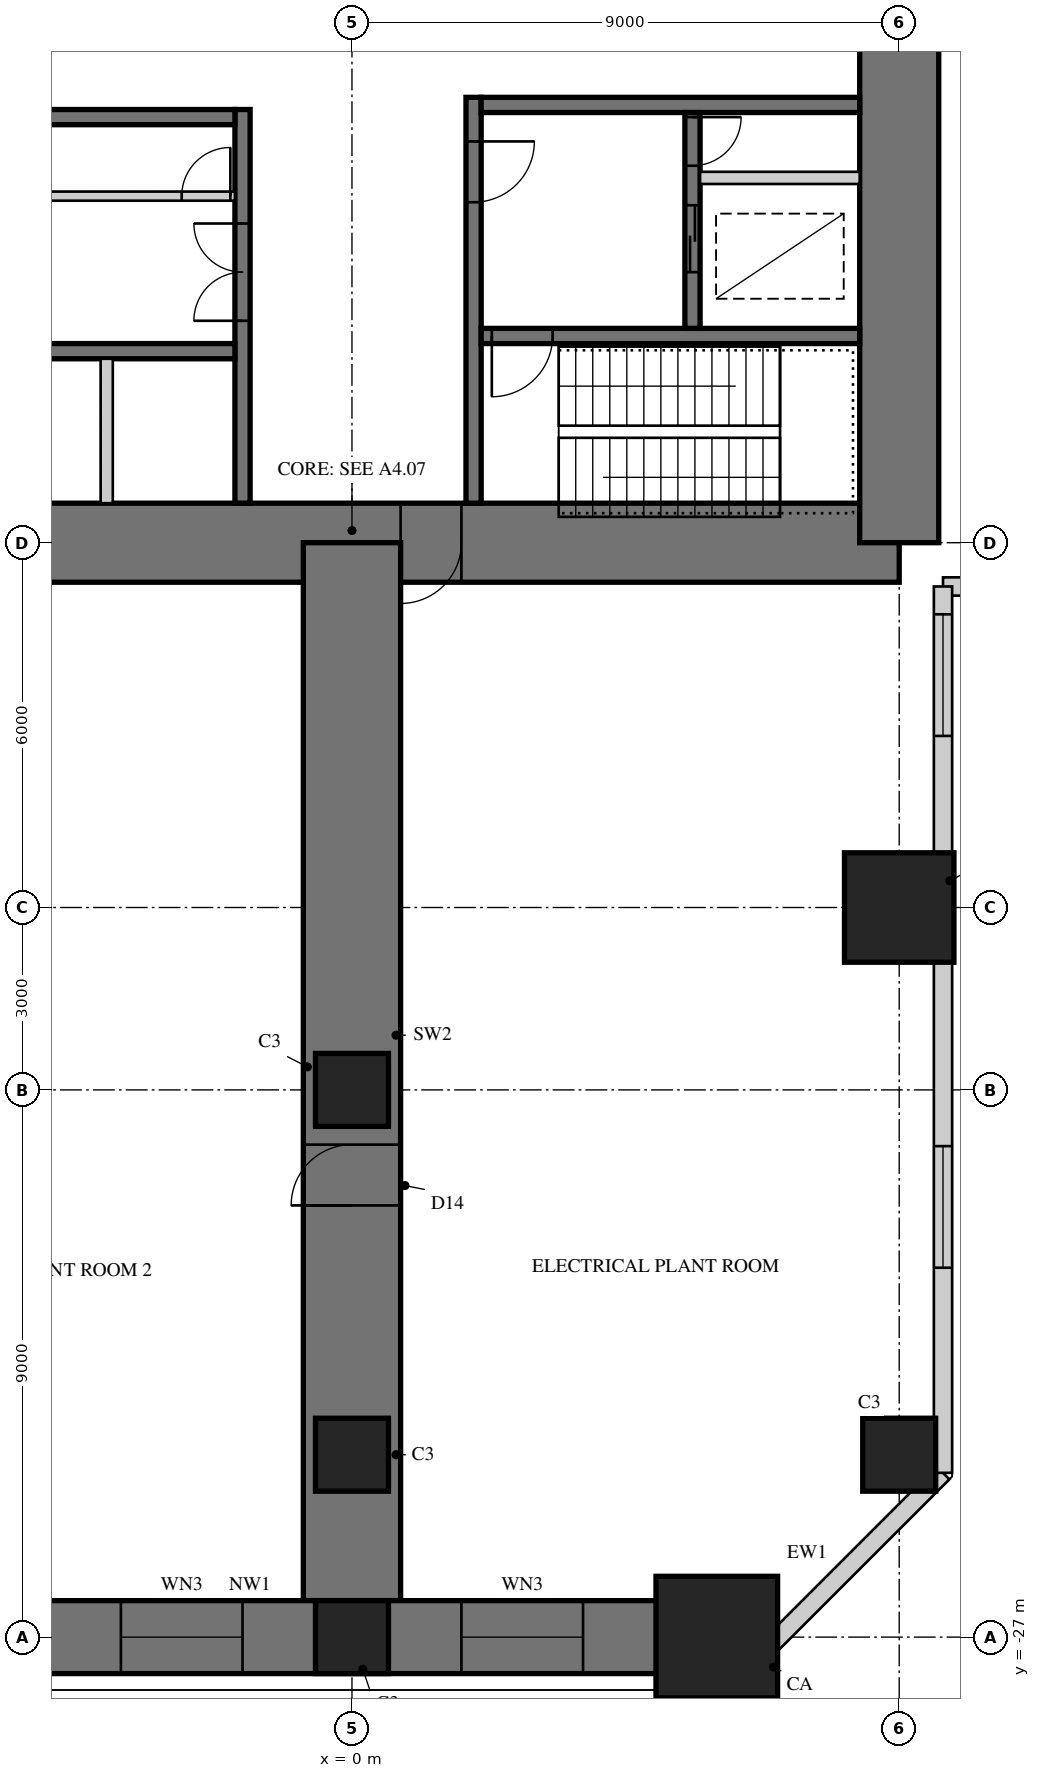
"""IFC4 building model, lengths in metres.
Left out: names, types, materials, properties, quantities, classifications, styles, units other than length and angle.
Written with IfcOpenShell. Run it as: python <this file> out.ifc"""

import sys

from ifc_helpers import new_model, si_unit, direction, frame, frame_2d, origin, origin_2d, place, context, subcontext, project, spatial, rectangle, hollow_rectangle, extrude, element, fill, save


model = new_model("IFC4")
c1 = context("Model", 3, precision=1e-05, world=origin(), true_north=direction((0.0, 1.0)))
c2 = subcontext(c1, "Body", "Model", "MODEL_VIEW")
j1 = project(units=[si_unit("LENGTHUNIT", "METRE"), si_unit("PLANEANGLEUNIT", "RADIAN")], contexts=[c1])
p1 = place(None, origin())
s1 = spatial("IfcSite", under=j1, at=p1, CompositionType="ELEMENT")
p2 = place(p1, origin())
s2 = spatial("IfcBuilding", under=s1, at=p2, CompositionType="ELEMENT")
p3 = place(p2, frame((0.0, 0.0, 18.5)))
s3 = spatial("IfcBuildingStorey", under=s2, at=p3, CompositionType="ELEMENT", Elevation=18.5)
p4 = place(p3, frame((-9.0, -9.0, 0.0), z_axis=(0.0, 0.0, 1.0), x_axis=(1.0, 0.0, 0.0)))
e1 = element("IfcWall", 1, at=p4, inside=s3, PredefinedType="SHEAR", context=c2, shape_type="SweptSolid", body=[
    extrude(rectangle(XDim=18.0, YDim=1.3, at=frame_2d((9.0, 0.0))), origin(), (0.0, 0.0, 1.0), 5.0),
])
p5 = place(p4, frame((9.8, 0.0, 0.0)))
e2 = element("IfcOpeningElement", 2, at=p5, cuts=e1, PredefinedType="OPENING", context=c2, shape_type="SweptSolid", body=[
    extrude(rectangle(XDim=1.0, YDim=2.4, at=frame_2d((0.5, 1.2))), frame((0.0, 0.66, 0.0), z_axis=(0.0, -1.0, 0.0), x_axis=(1.0, 0.0, 0.0)), (0.0, 0.0, 1.0), 1.32),
])
p6 = place(p3, frame((9.0, -9.0, 0.0), z_axis=(0.0, 0.0, 1.0), x_axis=(0.0, 1.0, 0.0)))
e3 = element("IfcWall", 3, at=p6, inside=s3, PredefinedType="SHEAR", context=c2, shape_type="SweptSolid", body=[
    extrude(rectangle(XDim=18.0, YDim=1.3, at=frame_2d((9.0, 0.0))), origin(), (0.0, 0.0, 1.0), 5.0),
])
p7 = place(p6, frame((9.8, 0.0, 0.0)))
e4 = element("IfcOpeningElement", 4, at=p7, cuts=e3, PredefinedType="OPENING", context=c2, shape_type="SweptSolid", body=[
    extrude(rectangle(XDim=1.0, YDim=2.4, at=frame_2d((0.5, 1.2))), frame((0.0, 0.66, 0.0), z_axis=(0.0, -1.0, 0.0), x_axis=(1.0, 0.0, 0.0)), (0.0, 0.0, 1.0), 1.32),
])
p8 = place(p3, frame((-1.8, -1.875, 0.0), z_axis=(0.0, 0.0, 1.0), x_axis=(0.0, -1.0, 0.0)))
e5 = element("IfcWall", 5, at=p8, inside=s3, PredefinedType="SHEAR", context=c2, shape_type="SweptSolid", body=[
    extrude(rectangle(XDim=6.475, YDim=0.25, at=frame_2d((3.238, 0.0))), origin(), (0.0, 0.0, 1.0), 5.0),
])
p9 = place(p8, frame((1.875, 0.0, 0.0)))
e6 = element("IfcOpeningElement", 6, at=p9, cuts=e5, PredefinedType="OPENING", context=c2, shape_type="SweptSolid", body=[
    extrude(rectangle(XDim=1.6, YDim=2.4, at=frame_2d((0.8, 1.2))), frame((0.0, 0.135, 0.0), z_axis=(0.0, -1.0, 0.0), x_axis=(1.0, 0.0, 0.0)), (0.0, 0.0, 1.0), 0.27),
])
for number, where, z_axis, x_axis in (
    (7, (-1.925, -2.0, 0.0), (0.0, 0.0, 1.0), (-1.0, 0.0, 0.0)),
    (8, (-1.925, -5.85, 0.0), (0.0, 0.0, 1.0), (-1.0, 0.0, 0.0)),
):
    element("IfcWall", number, at=place(p3, frame(where, z_axis=z_axis, x_axis=x_axis)), inside=s3, PredefinedType="SHEAR", context=c2, shape_type="SweptSolid", body=[
        extrude(rectangle(XDim=6.425, YDim=0.25, at=frame_2d((3.212, 0.0))), origin(), (0.0, 0.0, 1.0), 5.0),
    ])
p10 = place(p3, frame((-1.925, -3.3, 0.0), z_axis=(0.0, 0.0, 1.0), x_axis=(-1.0, 0.0, 0.0)))
e9 = element("IfcWall", 9, at=p10, inside=s3, PredefinedType="PARTITIONING", context=c2, shape_type="SweptSolid", body=[
    extrude(rectangle(XDim=6.425, YDim=0.15, at=frame_2d((3.212, 0.0))), origin(), (0.0, 0.0, 1.0), 5.0),
])
p11 = place(p10, frame((0.075, 0.0, 0.0)))
e10 = element("IfcOpeningElement", 10, at=p11, cuts=e9, PredefinedType="OPENING", context=c2, shape_type="SweptSolid", body=[
    extrude(rectangle(XDim=0.8, YDim=2.1, at=frame_2d((0.4, 1.05))), frame((0.0, 0.085, 0.0), z_axis=(0.0, -1.0, 0.0), x_axis=(1.0, 0.0, 0.0)), (0.0, 0.0, 1.0), 0.17),
])
p12 = place(p10, frame((3.675, 0.0, 0.0)))
e11 = element("IfcOpeningElement", 11, at=p12, cuts=e9, PredefinedType="OPENING", context=c2, shape_type="SweptSolid", body=[
    extrude(rectangle(XDim=0.8, YDim=2.1, at=frame_2d((0.4, 1.05))), frame((0.0, 0.085, 0.0), z_axis=(0.0, -1.0, 0.0), x_axis=(1.0, 0.0, 0.0)), (0.0, 0.0, 1.0), 0.17),
])
p13 = place(p3, frame((-4.033, -5.975, 0.0), z_axis=(0.0, 0.0, 1.0), x_axis=(0.0, -1.0, 0.0)))
e12 = element("IfcWall", 12, at=p13, inside=s3, PredefinedType="PARTITIONING", context=c2, shape_type="SweptSolid", body=[
    extrude(rectangle(XDim=2.375, YDim=0.2, at=frame_2d((1.188, 0.0))), origin(), (0.0, 0.0, 1.0), 5.0),
])
p14 = place(p3, frame((2.0, -1.675, 0.0), z_axis=(0.0, 0.0, 1.0), x_axis=(0.0, -1.0, 0.0)))
e13 = element("IfcWall", 13, at=p14, inside=s3, PredefinedType="SHEAR", context=c2, shape_type="SweptSolid", body=[
    extrude(rectangle(XDim=6.675, YDim=0.25, at=frame_2d((3.337, 0.0))), origin(), (0.0, 0.0, 1.0), 5.0),
])
p15 = place(p14, frame((0.725, 0.0, 0.0)))
e14 = element("IfcOpeningElement", 14, at=p15, cuts=e13, PredefinedType="OPENING", context=c2, shape_type="SweptSolid", body=[
    extrude(rectangle(XDim=1.0, YDim=2.1, at=frame_2d((0.5, 1.05))), frame((0.0, 0.135, 0.0), z_axis=(0.0, -1.0, 0.0), x_axis=(1.0, 0.0, 0.0)), (0.0, 0.0, 1.0), 0.27),
])
p16 = place(p3, frame((2.125, -1.8, 0.0), z_axis=(0.0, 0.0, 1.0), x_axis=(1.0, 0.0, 0.0)))
e15 = element("IfcWall", 15, at=p16, inside=s3, PredefinedType="SHEAR", context=c2, shape_type="SweptSolid", body=[
    extrude(rectangle(XDim=6.225, YDim=0.25, at=frame_2d((3.113, 0.0))), origin(), (0.0, 0.0, 1.0), 5.0),
])
p17 = place(p3, frame((2.125, -5.6, 0.0), z_axis=(0.0, 0.0, 1.0), x_axis=(1.0, 0.0, 0.0)))
e16 = element("IfcWall", 16, at=p17, inside=s3, PredefinedType="SHEAR", context=c2, shape_type="SweptSolid", body=[
    extrude(rectangle(XDim=6.225, YDim=0.25, at=frame_2d((3.113, 0.0))), origin(), (0.0, 0.0, 1.0), 5.0),
])
p18 = place(p17, frame((0.175, 0.0, 0.0)))
e17 = element("IfcOpeningElement", 17, at=p18, cuts=e16, PredefinedType="OPENING", context=c2, shape_type="SweptSolid", body=[
    extrude(rectangle(XDim=1.0, YDim=2.1, at=frame_2d((0.5, 1.05))), frame((0.0, 0.135, 0.0), z_axis=(0.0, -1.0, 0.0), x_axis=(1.0, 0.0, 0.0)), (0.0, 0.0, 1.0), 0.27),
])
p19 = place(p3, frame((5.6, -1.925, 0.0), z_axis=(0.0, 0.0, 1.0), x_axis=(0.0, -1.0, 0.0)))
e18 = element("IfcWall", 18, at=p19, inside=s3, PredefinedType="SHEAR", context=c2, shape_type="SweptSolid", body=[
    extrude(rectangle(XDim=3.55, YDim=0.25, at=frame_2d((1.775, 0.0))), origin(), (0.0, 0.0, 1.0), 5.0),
])
p20 = place(p19, frame((1.525, 0.0, 0.0)))
e19 = element("IfcOpeningElement", 19, at=p20, cuts=e18, PredefinedType="OPENING", context=c2, shape_type="SweptSolid", body=[
    extrude(rectangle(XDim=1.1, YDim=2.2, at=frame_2d((0.55, 1.1))), frame((0.0, 0.135, 0.0), z_axis=(0.0, -1.0, 0.0), x_axis=(1.0, 0.0, 0.0)), (0.0, 0.0, 1.0), 0.27),
])
p21 = place(p19, frame((0.075, 0.0, 0.0)))
e20 = element("IfcOpeningElement", 20, at=p21, cuts=e18, PredefinedType="OPENING", context=c2, shape_type="SweptSolid", body=[
    extrude(rectangle(XDim=0.8, YDim=2.1, at=frame_2d((0.4, 1.05))), frame((0.0, 0.135, 0.0), z_axis=(0.0, -1.0, 0.0), x_axis=(1.0, 0.0, 0.0)), (0.0, 0.0, 1.0), 0.27),
])
p22 = place(p3, frame((5.725, -3.0, 0.0), z_axis=(0.0, 0.0, 1.0), x_axis=(1.0, 0.0, 0.0)))
e21 = element("IfcWall", 21, at=p22, inside=s3, PredefinedType="PARTITIONING", context=c2, shape_type="SweptSolid", body=[
    extrude(rectangle(XDim=2.625, YDim=0.2, at=frame_2d((1.312, 0.0))), origin(), (0.0, 0.0, 1.0), 5.0),
])
p23 = place(p3, frame((0.0, -9.0, 0.0), z_axis=(0.0, 0.0, 1.0), x_axis=(0.0, -1.0, 0.0)))
e22 = element("IfcWall", 22, at=p23, inside=s3, PredefinedType="SHEAR", context=c2, shape_type="SweptSolid", body=[
    extrude(rectangle(XDim=18.0, YDim=1.6, at=frame_2d((9.0, 0.0))), origin(), (0.0, 0.0, 1.0), 5.0),
])
p24 = place(p23, frame((9.9, 0.0, 0.0)))
e23 = element("IfcOpeningElement", 23, at=p24, cuts=e22, PredefinedType="OPENING", context=c2, shape_type="SweptSolid", body=[
    extrude(rectangle(XDim=1.0, YDim=2.2, at=frame_2d((0.5, 1.1))), frame((0.0, 0.81, 0.0), z_axis=(0.0, -1.0, 0.0), x_axis=(1.0, 0.0, 0.0)), (0.0, 0.0, 1.0), 1.62),
])
p25 = place(p3, frame((-6.0, -27.0, 0.0), z_axis=(0.0, 0.0, 1.0), x_axis=(1.0, 0.0, 0.0)))
e24 = element("IfcWall", 24, at=p25, inside=s3, PredefinedType="SHEAR", context=c2, shape_type="SweptSolid", body=[
    extrude(rectangle(XDim=12.0, YDim=1.2, at=frame_2d((6.0, 0.0))), origin(), (0.0, 0.0, 1.0), 5.0),
])
p26 = place(p25, frame((2.2, 0.0, 0.8)))
e25 = element("IfcOpeningElement", 25, at=p26, cuts=e24, PredefinedType="OPENING", context=c2, shape_type="SweptSolid", body=[
    extrude(rectangle(XDim=2.0, YDim=2.5, at=frame_2d((1.0, 1.25))), frame((0.0, 0.61, 0.0), z_axis=(0.0, -1.0, 0.0), x_axis=(1.0, 0.0, 0.0)), (0.0, 0.0, 1.0), 1.22),
])
p27 = place(p25, frame((7.8, 0.0, 0.8)))
e26 = element("IfcOpeningElement", 26, at=p27, cuts=e24, PredefinedType="OPENING", context=c2, shape_type="SweptSolid", body=[
    extrude(rectangle(XDim=2.0, YDim=2.5, at=frame_2d((1.0, 1.25))), frame((0.0, 0.61, 0.0), z_axis=(0.0, -1.0, 0.0), x_axis=(1.0, 0.0, 0.0)), (0.0, 0.0, 1.0), 1.22),
])
p28 = place(p3, frame((9.0, -15.0, 0.0), z_axis=(0.0, 0.0, 1.0), x_axis=(1.0, 0.0, 0.0)))
e27 = element("IfcColumn", 27, at=p28, inside=s3, PredefinedType="COLUMN", context=c2, shape_type="SweptSolid", body=[
    extrude(rectangle(XDim=1.8, YDim=1.8, at=origin_2d()), origin(), (0.0, 0.0, 1.0), 5.0),
])
for number, where, z_axis, x_axis in (
    (28, (9.0, -24.0, 0.0), (0.0, 0.0, 1.0), (1.0, 0.0, 0.0)),
    (29, (0.0, -27.0, 0.0), (0.0, 0.0, 1.0), (1.0, 0.0, 0.0)),
):
    element("IfcColumn", number, at=place(p3, frame(where, z_axis=z_axis, x_axis=x_axis)), inside=s3, PredefinedType="COLUMN", context=c2, shape_type="SweptSolid", body=[
        extrude(rectangle(XDim=1.2, YDim=1.2, at=origin_2d()), origin(), (0.0, 0.0, 1.0), 5.0),
    ])
p29 = place(p3, frame((6.0, -27.0, 0.0), z_axis=(0.0, 0.0, 1.0), x_axis=(1.0, 0.0, 0.0)))
e30 = element("IfcColumn", 30, at=p29, inside=s3, PredefinedType="COLUMN", context=c2, shape_type="SweptSolid", body=[
    extrude(rectangle(XDim=2.0, YDim=2.0, at=origin_2d()), origin(), (0.0, 0.0, 1.0), 5.0),
])
for number, where, z_axis, x_axis in (
    (31, (0.0, -18.0, 0.0), (0.0, 0.0, 1.0), (1.0, 0.0, 0.0)),
    (32, (0.0, -24.0, 0.0), (0.0, 0.0, 1.0), (1.0, 0.0, 0.0)),
):
    element("IfcColumn", number, at=place(p3, frame(where, z_axis=z_axis, x_axis=x_axis)), inside=s3, PredefinedType="COLUMN", context=c2, shape_type="SweptSolid", body=[
        extrude(rectangle(XDim=1.2, YDim=1.2, at=origin_2d()), origin(), (0.0, 0.0, 1.0), 5.0),
    ])
p30 = place(p3, frame((9.72, -9.72, 0.0), z_axis=(0.0, 0.0, 1.0), x_axis=(1.0, 0.0, 0.0)))
e33 = element("IfcWall", 33, at=p30, inside=s3, PredefinedType="SOLIDWALL", context=c2, shape_type="SweptSolid", body=[
    extrude(rectangle(XDim=14.578, YDim=0.3, at=frame_2d((7.289, 0.0))), origin(), (0.0, 0.0, 1.0), 4.8),
])
p31 = place(p30, frame((0.458, 0.0, 0.8)))
e34 = element("IfcOpeningElement", 34, at=p31, cuts=e33, PredefinedType="OPENING", context=c2, shape_type="SweptSolid", body=[
    extrude(rectangle(XDim=2.0, YDim=2.5, at=frame_2d((1.0, 1.25))), frame((0.0, 0.16, 0.0), z_axis=(0.0, -1.0, 0.0), x_axis=(1.0, 0.0, 0.0)), (0.0, 0.0, 1.0), 0.32),
])
p32 = place(p30, frame((9.205, 0.0, 0.8)))
e35 = element("IfcOpeningElement", 35, at=p32, cuts=e33, PredefinedType="OPENING", context=c2, shape_type="SweptSolid", body=[
    extrude(rectangle(XDim=2.0, YDim=2.5, at=frame_2d((1.0, 1.25))), frame((0.0, 0.16, 0.0), z_axis=(0.0, -1.0, 0.0), x_axis=(1.0, 0.0, 0.0)), (0.0, 0.0, 1.0), 0.32),
])
p33 = place(p3, frame((6.418, -27.6, 0.0), z_axis=(0.0, 0.0, 1.0), x_axis=(0.707106781187, 0.707106781187, 0.0)))
e36 = element("IfcWall", 36, at=p33, inside=s3, PredefinedType="SOLIDWALL", context=c2, shape_type="SweptSolid", body=[
    extrude(rectangle(XDim=4.669, YDim=0.3, at=frame_2d((2.335, 0.0))), origin(), (0.0, 0.0, 1.0), 4.8),
])
p34 = place(p3, frame((9.72, -24.298, 0.0), z_axis=(0.0, 0.0, 1.0), x_axis=(0.0, 1.0, 0.0)))
e37 = element("IfcWall", 37, at=p34, inside=s3, PredefinedType="SOLIDWALL", context=c2, shape_type="SweptSolid", body=[
    extrude(rectangle(XDim=14.578, YDim=0.3, at=frame_2d((7.289, 0.0))), origin(), (0.0, 0.0, 1.0), 4.8),
])
p35 = place(p34, frame((3.374, 0.0, 0.8)))
e38 = element("IfcOpeningElement", 38, at=p35, cuts=e37, PredefinedType="OPENING", context=c2, shape_type="SweptSolid", body=[
    extrude(rectangle(XDim=2.0, YDim=2.5, at=frame_2d((1.0, 1.25))), frame((0.0, 0.16, 0.0), z_axis=(0.0, -1.0, 0.0), x_axis=(1.0, 0.0, 0.0)), (0.0, 0.0, 1.0), 0.32),
])
p36 = place(p34, frame((12.12, 0.0, 0.8)))
e39 = element("IfcOpeningElement", 39, at=p36, cuts=e37, PredefinedType="OPENING", context=c2, shape_type="SweptSolid", body=[
    extrude(rectangle(XDim=2.0, YDim=2.5, at=frame_2d((1.0, 1.25))), frame((0.0, 0.16, 0.0), z_axis=(0.0, -1.0, 0.0), x_axis=(1.0, 0.0, 0.0)), (0.0, 0.0, 1.0), 0.32),
])
p37 = place(p26, origin())
e40 = element("IfcWindow", 40, at=p37, inside=s3, PartitioningType="SINGLE_PANEL", PredefinedType="WINDOW", context=c2, shape_type="SweptSolid", body=[
    extrude(hollow_rectangle(XDim=2.0, YDim=2.5, WallThickness=0.06, at=frame_2d((1.0, 1.25))), frame((0.0, 0.03, 0.0), z_axis=(0.0, -1.0, 0.0), x_axis=(1.0, 0.0, 0.0)), (0.0, 0.0, 1.0), 0.06),
    extrude(rectangle(XDim=1.879, YDim=2.379, at=frame_2d((1.0, 1.25))), frame((0.0, 0.03, 0.0), z_axis=(0.0, -1.0, 0.0), x_axis=(1.0, 0.0, 0.0)), (0.0, 0.0, 1.0), 0.06),
])
fill(e25, e40)
p38 = place(p27, origin())
e41 = element("IfcWindow", 41, at=p38, inside=s3, PartitioningType="SINGLE_PANEL", PredefinedType="WINDOW", context=c2, shape_type="SweptSolid", body=[
    extrude(hollow_rectangle(XDim=2.0, YDim=2.5, WallThickness=0.06, at=frame_2d((1.0, 1.25))), frame((0.0, 0.03, 0.0), z_axis=(0.0, -1.0, 0.0), x_axis=(1.0, 0.0, 0.0)), (0.0, 0.0, 1.0), 0.06),
    extrude(rectangle(XDim=1.879, YDim=2.379, at=frame_2d((1.0, 1.25))), frame((0.0, 0.03, 0.0), z_axis=(0.0, -1.0, 0.0), x_axis=(1.0, 0.0, 0.0)), (0.0, 0.0, 1.0), 0.06),
])
fill(e26, e41)
p39 = place(p35, origin())
e42 = element("IfcWindow", 42, at=p39, inside=s3, PartitioningType="SINGLE_PANEL", PredefinedType="WINDOW", context=c2, shape_type="SweptSolid", body=[
    extrude(hollow_rectangle(XDim=2.0, YDim=2.5, WallThickness=0.06, at=frame_2d((1.0, 1.25))), frame((0.0, 0.03, 0.0), z_axis=(0.0, -1.0, 0.0), x_axis=(1.0, 0.0, 0.0)), (0.0, 0.0, 1.0), 0.06),
    extrude(rectangle(XDim=1.879, YDim=2.379, at=frame_2d((1.0, 1.25))), frame((0.0, 0.03, 0.0), z_axis=(0.0, -1.0, 0.0), x_axis=(1.0, 0.0, 0.0)), (0.0, 0.0, 1.0), 0.06),
])
fill(e38, e42)
p40 = place(p36, origin())
e43 = element("IfcWindow", 43, at=p40, inside=s3, PartitioningType="SINGLE_PANEL", PredefinedType="WINDOW", context=c2, shape_type="SweptSolid", body=[
    extrude(hollow_rectangle(XDim=2.0, YDim=2.5, WallThickness=0.06, at=frame_2d((1.0, 1.25))), frame((0.0, 0.03, 0.0), z_axis=(0.0, -1.0, 0.0), x_axis=(1.0, 0.0, 0.0)), (0.0, 0.0, 1.0), 0.06),
    extrude(rectangle(XDim=1.879, YDim=2.379, at=frame_2d((1.0, 1.25))), frame((0.0, 0.03, 0.0), z_axis=(0.0, -1.0, 0.0), x_axis=(1.0, 0.0, 0.0)), (0.0, 0.0, 1.0), 0.06),
])
fill(e39, e43)
p41 = place(p24, frame((1.0, 0.0, 0.0), z_axis=(0.0, 0.0, 1.0), x_axis=(-1.0, 0.0, 0.0)))
e44 = element("IfcDoor", 44, at=p41, inside=s3, OperationType="SINGLE_SWING_LEFT", PredefinedType="DOOR", context=c2, shape_type="SweptSolid", body=[
    extrude(rectangle(XDim=1.0, YDim=2.2, at=frame_2d((0.5, 1.1))), frame((0.0, 0.025, 0.0), z_axis=(0.0, -1.0, 0.0), x_axis=(1.0, 0.0, 0.0)), (0.0, 0.0, 1.0), 0.05),
])
fill(e23, e44)
p42 = place(p5, frame((1.0, 0.0, 0.0), z_axis=(0.0, 0.0, 1.0), x_axis=(-1.0, 0.0, 0.0)))
e45 = element("IfcDoor", 45, at=p42, inside=s3, OperationType="SINGLE_SWING_RIGHT", PredefinedType="DOOR", context=c2, shape_type="SweptSolid", body=[
    extrude(rectangle(XDim=1.0, YDim=2.4, at=frame_2d((0.5, 1.2))), frame((0.0, -0.005, 0.0), z_axis=(0.0, -1.0, 0.0), x_axis=(1.0, 0.0, 0.0)), (0.0, 0.0, 1.0), 0.05),
])
fill(e2, e45)
p43 = place(p9, frame((1.6, 0.0, 0.0), z_axis=(0.0, 0.0, 1.0), x_axis=(-1.0, 0.0, 0.0)))
e46 = element("IfcDoor", 46, at=p43, inside=s3, OperationType="DOUBLE_DOOR_SINGLE_SWING", PredefinedType="DOOR", context=c2, shape_type="SweptSolid", body=[
    extrude(rectangle(XDim=1.6, YDim=2.4, at=frame_2d((0.8, 1.2))), frame((0.0, 0.025, 0.0), z_axis=(0.0, -1.0, 0.0), x_axis=(1.0, 0.0, 0.0)), (0.0, 0.0, 1.0), 0.05),
])
fill(e6, e46)
p44 = place(p11, frame((0.8, 0.0, 0.0), z_axis=(0.0, 0.0, 1.0), x_axis=(-1.0, 0.0, 0.0)))
e47 = element("IfcDoor", 47, at=p44, inside=s3, OperationType="SINGLE_SWING_RIGHT", PredefinedType="DOOR", context=c2, shape_type="SweptSolid", body=[
    extrude(rectangle(XDim=0.8, YDim=2.1, at=frame_2d((0.4, 1.05))), frame((0.0, 0.025, 0.0), z_axis=(0.0, -1.0, 0.0), x_axis=(1.0, 0.0, 0.0)), (0.0, 0.0, 1.0), 0.05),
])
fill(e10, e47)
p45 = place(p15, origin())
e48 = element("IfcDoor", 48, at=p45, inside=s3, OperationType="SINGLE_SWING_LEFT", PredefinedType="DOOR", context=c2, shape_type="SweptSolid", body=[
    extrude(rectangle(XDim=1.0, YDim=2.1, at=frame_2d((0.5, 1.05))), frame((0.0, 0.025, 0.0), z_axis=(0.0, -1.0, 0.0), x_axis=(1.0, 0.0, 0.0)), (0.0, 0.0, 1.0), 0.05),
])
fill(e14, e48)
p46 = place(p18, frame((1.0, 0.0, 0.0), z_axis=(0.0, 0.0, 1.0), x_axis=(-1.0, 0.0, 0.0)))
e49 = element("IfcDoor", 49, at=p46, inside=s3, OperationType="SINGLE_SWING_RIGHT", PredefinedType="DOOR", context=c2, shape_type="SweptSolid", body=[
    extrude(rectangle(XDim=1.0, YDim=2.1, at=frame_2d((0.5, 1.05))), frame((0.0, 0.025, 0.0), z_axis=(0.0, -1.0, 0.0), x_axis=(1.0, 0.0, 0.0)), (0.0, 0.0, 1.0), 0.05),
])
fill(e17, e49)
p47 = place(p20, origin())
e50 = element("IfcDoor", 50, at=p47, inside=s3, OperationType="DOUBLE_DOOR_SLIDING", PredefinedType="DOOR", context=c2, shape_type="SweptSolid", body=[
    extrude(rectangle(XDim=1.1, YDim=2.2, at=frame_2d((0.55, 1.1))), frame((0.0, 0.025, 0.0), z_axis=(0.0, -1.0, 0.0), x_axis=(1.0, 0.0, 0.0)), (0.0, 0.0, 1.0), 0.05),
])
fill(e19, e50)
p48 = place(p21, origin())
e51 = element("IfcDoor", 51, at=p48, inside=s3, OperationType="SINGLE_SWING_LEFT", PredefinedType="DOOR", context=c2, shape_type="SweptSolid", body=[
    extrude(rectangle(XDim=0.8, YDim=2.1, at=frame_2d((0.4, 1.05))), frame((0.0, 0.025, 0.0), z_axis=(0.0, -1.0, 0.0), x_axis=(1.0, 0.0, 0.0)), (0.0, 0.0, 1.0), 0.05),
])
fill(e20, e51)
save(model, sys.argv[1])
